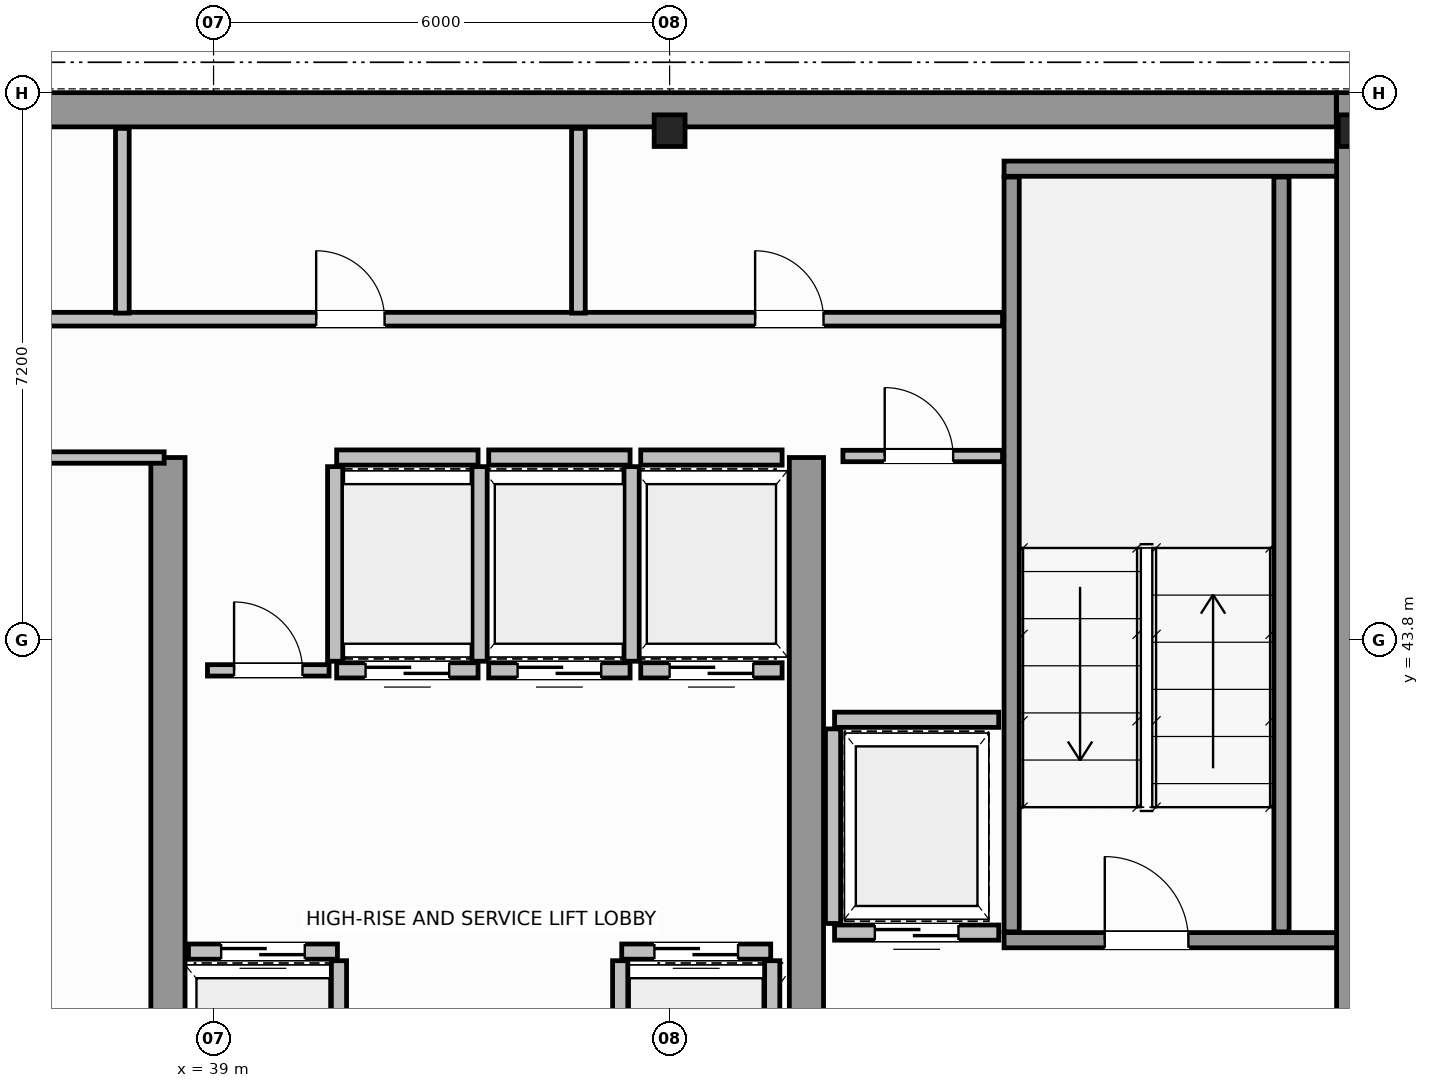
"""IFC4 building model, lengths in metres.
Left out: names, types, materials, properties, quantities, classifications, styles, units other than length and angle.
Written with IfcOpenShell. Run it as: python <this file> out.ifc"""

import sys

from ifc_helpers import new_model, si_unit, direction, frame, frame_2d, origin, origin_2d, place, context, subcontext, project, spatial, rectangle, i_section, extrude, source, transform, mapped, element, fill, save


model = new_model("IFC4")
c1 = context("Model", 3, precision=1e-05, world=origin(), true_north=direction((0.0, 1.0)))
c2 = subcontext(c1, "Body", "Model", "MODEL_VIEW")
j1 = project(units=[si_unit("LENGTHUNIT", "METRE"), si_unit("PLANEANGLEUNIT", "RADIAN")], contexts=[c1])
p1 = place(None, origin())
s1 = spatial("IfcSite", under=j1, at=p1, CompositionType="ELEMENT")
p2 = place(p1, origin())
s2 = spatial("IfcBuilding", under=s1, at=p2, CompositionType="ELEMENT")
p3 = place(p2, frame((0.0, 0.0, 295.4)))
s3 = spatial("IfcBuildingStorey", under=s2, at=p3, CompositionType="ELEMENT", Elevation=295.4)
m1 = source(origin(), c2, "Body", "SweptSolid", [
    extrude(i_section(OverallWidth=0.406, OverallDepth=0.416, WebThickness=0.03, FlangeThickness=0.042, FilletRadius=0.015, at=origin_2d()), origin(), (0.0, 0.0, 1.0), 3.8),
])
for number, where, z_axis, x_axis in (
    (1, (45.0, 50.5, 0.0), (0.0, 0.0, 1.0), (1.0, 0.0, 0.0)),
    (2, (54.0, 50.5, 0.0), (0.0, 0.0, 1.0), (1.0, 0.0, 0.0)),
):
    element("IfcColumn", number, at=place(p3, frame(where, z_axis=z_axis, x_axis=x_axis)), inside=s3, PredefinedType="COLUMN", context=c2, shape_type="MappedRepresentation", body=[
        mapped(m1, transform((0.0, 0.0, 0.0), scale=1.0)),
    ])
p4 = place(p3, frame((34.002, 50.775, 0.0), z_axis=(0.0, 0.0, 1.0), x_axis=(1.0, 0.0, 0.0)))
e3 = element("IfcWall", 3, at=p4, inside=s3, PredefinedType="SHEAR", context=c2, shape_type="SweptSolid", body=[
    extrude(rectangle(XDim=19.769, YDim=0.45, at=frame_2d((9.885, 0.0))), origin(), (0.0, 0.0, 1.0), 3.8),
])
p5 = place(p3, frame((54.0, 36.5, 0.0), z_axis=(0.0, 0.0, 1.0), x_axis=(0.0, 1.0, 0.0)))
e4 = element("IfcWall", 4, at=p5, inside=s3, PredefinedType="SHEAR", context=c2, shape_type="SweptSolid", body=[
    extrude(rectangle(XDim=14.5, YDim=0.45, at=frame_2d((7.25, 0.0))), origin(), (0.0, 0.0, 1.0), 3.8),
])
for number, where, z_axis, x_axis in (
    (5, (38.4, 36.745, 0.0), (0.0, 0.0, 1.0), (0.0, 1.0, 0.0)),
    (6, (46.8, 36.745, 0.0), (0.0, 0.0, 1.0), (0.0, 1.0, 0.0)),
):
    element("IfcWall", number, at=place(p3, frame(where, z_axis=z_axis, x_axis=x_axis)), inside=s3, PredefinedType="SHEAR", context=c2, shape_type="SweptSolid", body=[
        extrude(rectangle(XDim=9.455, YDim=0.45, at=frame_2d((4.728, 0.0))), origin(), (0.0, 0.0, 1.0), 3.8),
    ])
p6 = place(p3, frame((49.4, 39.85, 0.0), z_axis=(0.0, 0.0, 1.0), x_axis=(1.0, 0.0, 0.0)))
e7 = element("IfcWall", 7, at=p6, inside=s3, PredefinedType="SOLIDWALL", context=c2, shape_type="SweptSolid", body=[
    extrude(rectangle(XDim=4.375, YDim=0.2, at=frame_2d((2.188, 0.0))), origin(), (0.0, 0.0, 1.0), 3.8),
])
p7 = place(p6, frame((1.325, 0.0, 0.0)))
e8 = element("IfcOpeningElement", 8, at=p7, cuts=e7, PredefinedType="OPENING", context=c2, shape_type="SweptSolid", body=[
    extrude(rectangle(XDim=1.1, YDim=2.15, at=frame_2d((0.55, 1.075))), frame((0.0, 0.11, 0.0), z_axis=(0.0, -1.0, 0.0), x_axis=(1.0, 0.0, 0.0)), (0.0, 0.0, 1.0), 0.22),
])
p8 = place(p3, frame((49.4, 50.0, 0.0), z_axis=(0.0, 0.0, 1.0), x_axis=(1.0, 0.0, 0.0)))
e9 = element("IfcWall", 9, at=p8, inside=s3, PredefinedType="SOLIDWALL", context=c2, shape_type="SweptSolid", body=[
    extrude(rectangle(XDim=4.375, YDim=0.2, at=frame_2d((2.188, 0.0))), origin(), (0.0, 0.0, 1.0), 3.8),
])
for number, where, z_axis, x_axis in (
    (10, (49.5, 39.96, 0.0), (0.0, 0.0, 1.0), (0.0, 1.0, 0.0)),
    (11, (53.05, 39.96, 0.0), (0.0, 0.0, 1.0), (0.0, 1.0, 0.0)),
):
    element("IfcWall", number, at=place(p3, frame(where, z_axis=z_axis, x_axis=x_axis)), inside=s3, PredefinedType="SOLIDWALL", context=c2, shape_type="SweptSolid", body=[
        extrude(rectangle(XDim=9.93, YDim=0.2, at=frame_2d((4.965, 0.0))), origin(), (0.0, 0.0, 1.0), 3.8),
    ])
p9 = place(p3, frame((38.67, 39.7, 0.0), z_axis=(0.0, 0.0, 1.0), x_axis=(1.0, 0.0, 0.0)))
e12 = element("IfcWall", 12, at=p9, inside=s3, PredefinedType="SOLIDWALL", context=c2, shape_type="SweptSolid", body=[
    extrude(rectangle(XDim=1.96, YDim=0.2, at=frame_2d((0.98, 0.0))), origin(), (0.0, 0.0, 1.0), 3.58),
])
p10 = place(p9, frame((0.43, 0.0, 0.0)))
e13 = element("IfcOpeningElement", 13, at=p10, cuts=e12, PredefinedType="OPENING", context=c2, shape_type="SweptSolid", body=[
    extrude(rectangle(XDim=1.1, YDim=2.15, at=frame_2d((0.55, 1.075))), frame((0.0, 0.11, 0.0), z_axis=(0.0, -1.0, 0.0), x_axis=(1.0, 0.0, 0.0)), (0.0, 0.0, 1.0), 0.22),
])
p11 = place(p3, frame((40.65, 37.02, 0.0), z_axis=(0.0, 0.0, 1.0), x_axis=(0.0, 1.0, 0.0)))
e14 = element("IfcWall", 14, at=p11, inside=s3, PredefinedType="SOLIDWALL", context=c2, shape_type="SweptSolid", body=[
    extrude(rectangle(XDim=2.56, YDim=0.2, at=frame_2d((1.28, 0.0))), origin(), (0.0, 0.0, 1.0), 3.58),
])
p12 = place(p3, frame((44.37, 39.7, 0.0), z_axis=(0.0, 0.0, 1.0), x_axis=(1.0, 0.0, 0.0)))
e15 = element("IfcWall", 15, at=p12, inside=s3, PredefinedType="SOLIDWALL", context=c2, shape_type="SweptSolid", body=[
    extrude(rectangle(XDim=1.96, YDim=0.2, at=frame_2d((0.98, 0.0))), origin(), (0.0, 0.0, 1.0), 3.58),
])
p13 = place(p12, frame((0.43, 0.0, 0.0)))
e16 = element("IfcOpeningElement", 16, at=p13, cuts=e15, PredefinedType="OPENING", context=c2, shape_type="SweptSolid", body=[
    extrude(rectangle(XDim=1.1, YDim=2.15, at=frame_2d((0.55, 1.075))), frame((0.0, 0.11, 0.0), z_axis=(0.0, -1.0, 0.0), x_axis=(1.0, 0.0, 0.0)), (0.0, 0.0, 1.0), 0.22),
])
for number, where, z_axis, x_axis in (
    (17, (44.35, 37.02, 0.0), (0.0, 0.0, 1.0), (0.0, 1.0, 0.0)),
    (18, (46.35, 37.02, 0.0), (0.0, 0.0, 1.0), (0.0, 1.0, 0.0)),
):
    element("IfcWall", number, at=place(p3, frame(where, z_axis=z_axis, x_axis=x_axis)), inside=s3, PredefinedType="SOLIDWALL", context=c2, shape_type="SweptSolid", body=[
        extrude(rectangle(XDim=2.56, YDim=0.2, at=frame_2d((1.28, 0.0))), origin(), (0.0, 0.0, 1.0), 3.58),
    ])
p14 = place(p3, frame((40.62, 43.4, 0.0), z_axis=(0.0, 0.0, 1.0), x_axis=(1.0, 0.0, 0.0)))
e19 = element("IfcWall", 19, at=p14, inside=s3, PredefinedType="SOLIDWALL", context=c2, shape_type="SweptSolid", body=[
    extrude(rectangle(XDim=1.86, YDim=0.2, at=frame_2d((0.93, 0.0))), origin(), (0.0, 0.0, 1.0), 3.58),
])
p15 = place(p14, frame((0.38, 0.0, 0.0)))
e20 = element("IfcOpeningElement", 20, at=p15, cuts=e19, PredefinedType="OPENING", context=c2, shape_type="SweptSolid", body=[
    extrude(rectangle(XDim=1.1, YDim=2.15, at=frame_2d((0.55, 1.075))), frame((0.0, 0.11, 0.0), z_axis=(0.0, -1.0, 0.0), x_axis=(1.0, 0.0, 0.0)), (0.0, 0.0, 1.0), 0.22),
])
p16 = place(p3, frame((40.62, 46.2, 0.0), z_axis=(0.0, 0.0, 1.0), x_axis=(1.0, 0.0, 0.0)))
e21 = element("IfcWall", 21, at=p16, inside=s3, PredefinedType="SOLIDWALL", context=c2, shape_type="SweptSolid", body=[
    extrude(rectangle(XDim=1.86, YDim=0.2, at=frame_2d((0.93, 0.0))), origin(), (0.0, 0.0, 1.0), 3.58),
])
for number, where, z_axis, x_axis in (
    (22, (40.6, 43.52, 0.0), (0.0, 0.0, 1.0), (0.0, 1.0, 0.0)),
    (23, (42.5, 43.52, 0.0), (0.0, 0.0, 1.0), (0.0, 1.0, 0.0)),
):
    element("IfcWall", number, at=place(p3, frame(where, z_axis=z_axis, x_axis=x_axis)), inside=s3, PredefinedType="SOLIDWALL", context=c2, shape_type="SweptSolid", body=[
        extrude(rectangle(XDim=2.56, YDim=0.2, at=frame_2d((1.28, 0.0))), origin(), (0.0, 0.0, 1.0), 3.58),
    ])
p17 = place(p3, frame((42.62, 43.4, 0.0), z_axis=(0.0, 0.0, 1.0), x_axis=(1.0, 0.0, 0.0)))
e24 = element("IfcWall", 24, at=p17, inside=s3, PredefinedType="SOLIDWALL", context=c2, shape_type="SweptSolid", body=[
    extrude(rectangle(XDim=1.86, YDim=0.2, at=frame_2d((0.93, 0.0))), origin(), (0.0, 0.0, 1.0), 3.58),
])
p18 = place(p17, frame((0.38, 0.0, 0.0)))
e25 = element("IfcOpeningElement", 25, at=p18, cuts=e24, PredefinedType="OPENING", context=c2, shape_type="SweptSolid", body=[
    extrude(rectangle(XDim=1.1, YDim=2.15, at=frame_2d((0.55, 1.075))), frame((0.0, 0.11, 0.0), z_axis=(0.0, -1.0, 0.0), x_axis=(1.0, 0.0, 0.0)), (0.0, 0.0, 1.0), 0.22),
])
p19 = place(p3, frame((42.62, 46.2, 0.0), z_axis=(0.0, 0.0, 1.0), x_axis=(1.0, 0.0, 0.0)))
e26 = element("IfcWall", 26, at=p19, inside=s3, PredefinedType="SOLIDWALL", context=c2, shape_type="SweptSolid", body=[
    extrude(rectangle(XDim=1.86, YDim=0.2, at=frame_2d((0.93, 0.0))), origin(), (0.0, 0.0, 1.0), 3.58),
])
p20 = place(p3, frame((44.5, 43.52, 0.0), z_axis=(0.0, 0.0, 1.0), x_axis=(0.0, 1.0, 0.0)))
e27 = element("IfcWall", 27, at=p20, inside=s3, PredefinedType="SOLIDWALL", context=c2, shape_type="SweptSolid", body=[
    extrude(rectangle(XDim=2.56, YDim=0.2, at=frame_2d((1.28, 0.0))), origin(), (0.0, 0.0, 1.0), 3.58),
])
p21 = place(p3, frame((44.62, 43.4, 0.0), z_axis=(0.0, 0.0, 1.0), x_axis=(1.0, 0.0, 0.0)))
e28 = element("IfcWall", 28, at=p21, inside=s3, PredefinedType="SOLIDWALL", context=c2, shape_type="SweptSolid", body=[
    extrude(rectangle(XDim=1.86, YDim=0.2, at=frame_2d((0.93, 0.0))), origin(), (0.0, 0.0, 1.0), 3.58),
])
p22 = place(p21, frame((0.38, 0.0, 0.0)))
e29 = element("IfcOpeningElement", 29, at=p22, cuts=e28, PredefinedType="OPENING", context=c2, shape_type="SweptSolid", body=[
    extrude(rectangle(XDim=1.1, YDim=2.15, at=frame_2d((0.55, 1.075))), frame((0.0, 0.11, 0.0), z_axis=(0.0, -1.0, 0.0), x_axis=(1.0, 0.0, 0.0)), (0.0, 0.0, 1.0), 0.22),
])
p23 = place(p3, frame((44.62, 46.2, 0.0), z_axis=(0.0, 0.0, 1.0), x_axis=(1.0, 0.0, 0.0)))
e30 = element("IfcWall", 30, at=p23, inside=s3, PredefinedType="SOLIDWALL", context=c2, shape_type="SweptSolid", body=[
    extrude(rectangle(XDim=1.86, YDim=0.2, at=frame_2d((0.93, 0.0))), origin(), (0.0, 0.0, 1.0), 3.58),
])
p24 = place(p3, frame((47.17, 39.95, 0.0), z_axis=(0.0, 0.0, 1.0), x_axis=(1.0, 0.0, 0.0)))
e31 = element("IfcWall", 31, at=p24, inside=s3, PredefinedType="SOLIDWALL", context=c2, shape_type="SweptSolid", body=[
    extrude(rectangle(XDim=2.16, YDim=0.2, at=frame_2d((1.08, 0.0))), origin(), (0.0, 0.0, 1.0), 3.58),
])
p25 = place(p24, frame((0.53, 0.0, 0.0)))
e32 = element("IfcOpeningElement", 32, at=p25, cuts=e31, PredefinedType="OPENING", context=c2, shape_type="SweptSolid", body=[
    extrude(rectangle(XDim=1.1, YDim=2.15, at=frame_2d((0.55, 1.075))), frame((0.0, 0.11, 0.0), z_axis=(0.0, -1.0, 0.0), x_axis=(1.0, 0.0, 0.0)), (0.0, 0.0, 1.0), 0.22),
])
p26 = place(p3, frame((47.17, 42.75, 0.0), z_axis=(0.0, 0.0, 1.0), x_axis=(1.0, 0.0, 0.0)))
e33 = element("IfcWall", 33, at=p26, inside=s3, PredefinedType="SOLIDWALL", context=c2, shape_type="SweptSolid", body=[
    extrude(rectangle(XDim=2.16, YDim=0.2, at=frame_2d((1.08, 0.0))), origin(), (0.0, 0.0, 1.0), 3.58),
])
p27 = place(p3, frame((47.15, 40.07, 0.0), z_axis=(0.0, 0.0, 1.0), x_axis=(0.0, 1.0, 0.0)))
e34 = element("IfcWall", 34, at=p27, inside=s3, PredefinedType="SOLIDWALL", context=c2, shape_type="SweptSolid", body=[
    extrude(rectangle(XDim=2.56, YDim=0.2, at=frame_2d((1.28, 0.0))), origin(), (0.0, 0.0, 1.0), 3.58),
])
p28 = place(p3, frame((29.85, 46.2, 0.0), z_axis=(0.0, 0.0, 1.0), x_axis=(1.0, 0.0, 0.0)))
e35 = element("IfcWall", 35, at=p28, inside=s3, PredefinedType="PARTITIONING", context=c2, shape_type="SweptSolid", body=[
    extrude(rectangle(XDim=8.5, YDim=0.15, at=frame_2d((4.25, 0.0))), origin(), (0.0, 0.0, 1.0), 3.58),
])
p29 = place(p3, frame((47.28, 46.22, 0.0), z_axis=(0.0, 0.0, 1.0), x_axis=(1.0, 0.0, 0.0)))
e36 = element("IfcWall", 36, at=p29, inside=s3, PredefinedType="PARTITIONING", context=c2, shape_type="SweptSolid", body=[
    extrude(rectangle(XDim=2.1, YDim=0.15, at=frame_2d((1.05, 0.0))), origin(), (0.0, 0.0, 1.0), 3.58),
])
p30 = place(p29, frame((0.55, 0.0, 0.0)))
e37 = element("IfcOpeningElement", 37, at=p30, cuts=e36, PredefinedType="OPENING", context=c2, shape_type="SweptSolid", body=[
    extrude(rectangle(XDim=0.9, YDim=2.1, at=frame_2d((0.45, 1.05))), frame((0.0, 0.085, 0.0), z_axis=(0.0, -1.0, 0.0), x_axis=(1.0, 0.0, 0.0)), (0.0, 0.0, 1.0), 0.17),
])
p31 = place(p3, frame((38.92, 43.4, 0.0), z_axis=(0.0, 0.0, 1.0), x_axis=(1.0, 0.0, 0.0)))
e38 = element("IfcWall", 38, at=p31, inside=s3, PredefinedType="PARTITIONING", context=c2, shape_type="SweptSolid", body=[
    extrude(rectangle(XDim=1.6, YDim=0.15, at=frame_2d((0.8, 0.0))), origin(), (0.0, 0.0, 1.0), 3.58),
])
p32 = place(p31, frame((0.35, 0.0, 0.0)))
e39 = element("IfcOpeningElement", 39, at=p32, cuts=e38, PredefinedType="OPENING", context=c2, shape_type="SweptSolid", body=[
    extrude(rectangle(XDim=0.9, YDim=2.1, at=frame_2d((0.45, 1.05))), frame((0.0, 0.085, 0.0), z_axis=(0.0, -1.0, 0.0), x_axis=(1.0, 0.0, 0.0)), (0.0, 0.0, 1.0), 0.17),
])
p33 = place(p3, frame((18.62, 48.02, 0.0), z_axis=(0.0, 0.0, 1.0), x_axis=(1.0, 0.0, 0.0)))
e40 = element("IfcWall", 40, at=p33, inside=s3, PredefinedType="PLUMBINGWALL", context=c2, shape_type="SweptSolid", body=[
    extrude(rectangle(XDim=30.76, YDim=0.18, at=frame_2d((15.38, 0.0))), origin(), (0.0, 0.0, 1.0), 3.58),
])
p34 = place(p33, frame((1.655, 0.0, 0.0)))
e41 = element("IfcOpeningElement", 41, at=p34, cuts=e40, PredefinedType="OPENING", context=c2, shape_type="SweptSolid", body=[
    extrude(rectangle(XDim=0.9, YDim=2.15, at=frame_2d((0.45, 1.075))), frame((0.0, 0.1, 0.0), z_axis=(0.0, -1.0, 0.0), x_axis=(1.0, 0.0, 0.0)), (0.0, 0.0, 1.0), 0.2),
])
p35 = place(p33, frame((6.03, 0.0, 0.0)))
e42 = element("IfcOpeningElement", 42, at=p35, cuts=e40, PredefinedType="OPENING", context=c2, shape_type="SweptSolid", body=[
    extrude(rectangle(XDim=0.9, YDim=2.15, at=frame_2d((0.45, 1.075))), frame((0.0, 0.1, 0.0), z_axis=(0.0, -1.0, 0.0), x_axis=(1.0, 0.0, 0.0)), (0.0, 0.0, 1.0), 0.2),
])
p36 = place(p33, frame((10.93, 0.0, 0.0)))
e43 = element("IfcOpeningElement", 43, at=p36, cuts=e40, PredefinedType="OPENING", context=c2, shape_type="SweptSolid", body=[
    extrude(rectangle(XDim=0.9, YDim=2.15, at=frame_2d((0.45, 1.075))), frame((0.0, 0.1, 0.0), z_axis=(0.0, -1.0, 0.0), x_axis=(1.0, 0.0, 0.0)), (0.0, 0.0, 1.0), 0.2),
])
p37 = place(p33, frame((16.13, 0.0, 0.0)))
e44 = element("IfcOpeningElement", 44, at=p37, cuts=e40, PredefinedType="OPENING", context=c2, shape_type="SweptSolid", body=[
    extrude(rectangle(XDim=0.9, YDim=2.15, at=frame_2d((0.45, 1.075))), frame((0.0, 0.1, 0.0), z_axis=(0.0, -1.0, 0.0), x_axis=(1.0, 0.0, 0.0)), (0.0, 0.0, 1.0), 0.2),
])
p38 = place(p33, frame((21.73, 0.0, 0.0)))
e45 = element("IfcOpeningElement", 45, at=p38, cuts=e40, PredefinedType="OPENING", context=c2, shape_type="SweptSolid", body=[
    extrude(rectangle(XDim=0.9, YDim=2.15, at=frame_2d((0.45, 1.075))), frame((0.0, 0.1, 0.0), z_axis=(0.0, -1.0, 0.0), x_axis=(1.0, 0.0, 0.0)), (0.0, 0.0, 1.0), 0.2),
])
p39 = place(p33, frame((27.505, 0.0, 0.0)))
e46 = element("IfcOpeningElement", 46, at=p39, cuts=e40, PredefinedType="OPENING", context=c2, shape_type="SweptSolid", body=[
    extrude(rectangle(XDim=0.9, YDim=2.15, at=frame_2d((0.45, 1.075))), frame((0.0, 0.1, 0.0), z_axis=(0.0, -1.0, 0.0), x_axis=(1.0, 0.0, 0.0)), (0.0, 0.0, 1.0), 0.2),
])
for number, where, z_axis, x_axis in (
    (47, (37.8, 48.1, 0.0), (0.0, 0.0, 1.0), (0.0, 1.0, 0.0)),
    (48, (43.8, 48.1, 0.0), (0.0, 0.0, 1.0), (0.0, 1.0, 0.0)),
):
    element("IfcWall", number, at=place(p3, frame(where, z_axis=z_axis, x_axis=x_axis)), inside=s3, PredefinedType="PLUMBINGWALL", context=c2, shape_type="SweptSolid", body=[
        extrude(rectangle(XDim=2.43, YDim=0.18, at=frame_2d((1.215, 0.0))), origin(), (0.0, 0.0, 1.0), 3.58),
    ])
m2 = source(origin(), c2, "Body", "SweptSolid", [
    extrude(rectangle(XDim=1.1, YDim=2.15, at=frame_2d((0.55, 1.075))), frame((0.0, 0.025, 0.0), z_axis=(0.0, -1.0, 0.0), x_axis=(1.0, 0.0, 0.0)), (0.0, 0.0, 1.0), 0.05),
])
p40 = place(p7, origin())
e49 = element("IfcDoor", 49, at=p40, inside=s3, OperationType="SINGLE_SWING_RIGHT", PredefinedType="DOOR", context=c2, shape_type="MappedRepresentation", body=[
    mapped(m2, transform((0.0, 0.0, 0.0), scale=1.0)),
])
fill(e8, e49)
p41 = place(p10, origin())
e50 = element("IfcDoor", 50, at=p41, inside=s3, OperationType="DOUBLE_DOOR_SLIDING", PredefinedType="DOOR", context=c2, shape_type="MappedRepresentation", body=[
    mapped(m2, transform((0.0, 0.0, 0.0), scale=1.0)),
])
fill(e13, e50)
p42 = place(p13, origin())
e51 = element("IfcDoor", 51, at=p42, inside=s3, OperationType="DOUBLE_DOOR_SLIDING", PredefinedType="DOOR", context=c2, shape_type="MappedRepresentation", body=[
    mapped(m2, transform((0.0, 0.0, 0.0), scale=1.0)),
])
fill(e16, e51)
p43 = place(p15, origin())
e52 = element("IfcDoor", 52, at=p43, inside=s3, OperationType="DOUBLE_DOOR_SLIDING", PredefinedType="DOOR", context=c2, shape_type="MappedRepresentation", body=[
    mapped(m2, transform((0.0, 0.0, 0.0), scale=1.0)),
])
fill(e20, e52)
p44 = place(p18, origin())
e53 = element("IfcDoor", 53, at=p44, inside=s3, OperationType="DOUBLE_DOOR_SLIDING", PredefinedType="DOOR", context=c2, shape_type="MappedRepresentation", body=[
    mapped(m2, transform((0.0, 0.0, 0.0), scale=1.0)),
])
fill(e25, e53)
p45 = place(p22, origin())
e54 = element("IfcDoor", 54, at=p45, inside=s3, OperationType="DOUBLE_DOOR_SLIDING", PredefinedType="DOOR", context=c2, shape_type="MappedRepresentation", body=[
    mapped(m2, transform((0.0, 0.0, 0.0), scale=1.0)),
])
fill(e29, e54)
p46 = place(p25, origin())
e55 = element("IfcDoor", 55, at=p46, inside=s3, OperationType="DOUBLE_DOOR_SLIDING", PredefinedType="DOOR", context=c2, shape_type="MappedRepresentation", body=[
    mapped(m2, transform((0.0, 0.0, 0.0), scale=1.0)),
])
fill(e32, e55)
m3 = source(origin(), c2, "Body", "SweptSolid", [
    extrude(rectangle(XDim=0.9, YDim=2.1, at=frame_2d((0.45, 1.05))), frame((0.0, 0.025, 0.0), z_axis=(0.0, -1.0, 0.0), x_axis=(1.0, 0.0, 0.0)), (0.0, 0.0, 1.0), 0.05),
])
p47 = place(p30, origin())
e56 = element("IfcDoor", 56, at=p47, inside=s3, OperationType="SINGLE_SWING_RIGHT", PredefinedType="DOOR", context=c2, shape_type="MappedRepresentation", body=[
    mapped(m3, transform((0.0, 0.0, 0.0), scale=1.0)),
])
fill(e37, e56)
p48 = place(p32, origin())
e57 = element("IfcDoor", 57, at=p48, inside=s3, OperationType="SINGLE_SWING_LEFT", PredefinedType="DOOR", context=c2, shape_type="MappedRepresentation", body=[
    mapped(m3, transform((0.0, 0.0, 0.0), scale=1.0)),
])
fill(e39, e57)
m4 = source(origin(), c2, "Body", "SweptSolid", [
    extrude(rectangle(XDim=0.9, YDim=2.15, at=frame_2d((0.45, 1.075))), frame((0.0, 0.025, 0.0), z_axis=(0.0, -1.0, 0.0), x_axis=(1.0, 0.0, 0.0)), (0.0, 0.0, 1.0), 0.05),
])
p49 = place(p38, origin())
e58 = element("IfcDoor", 58, at=p49, inside=s3, OperationType="SINGLE_SWING_LEFT", PredefinedType="DOOR", context=c2, shape_type="MappedRepresentation", body=[
    mapped(m4, transform((0.0, 0.0, 0.0), scale=1.0)),
])
fill(e45, e58)
p50 = place(p39, origin())
e59 = element("IfcDoor", 59, at=p50, inside=s3, OperationType="SINGLE_SWING_RIGHT", PredefinedType="DOOR", context=c2, shape_type="MappedRepresentation", body=[
    mapped(m4, transform((0.0, 0.0, 0.0), scale=1.0)),
])
fill(e46, e59)
save(model, sys.argv[1])
